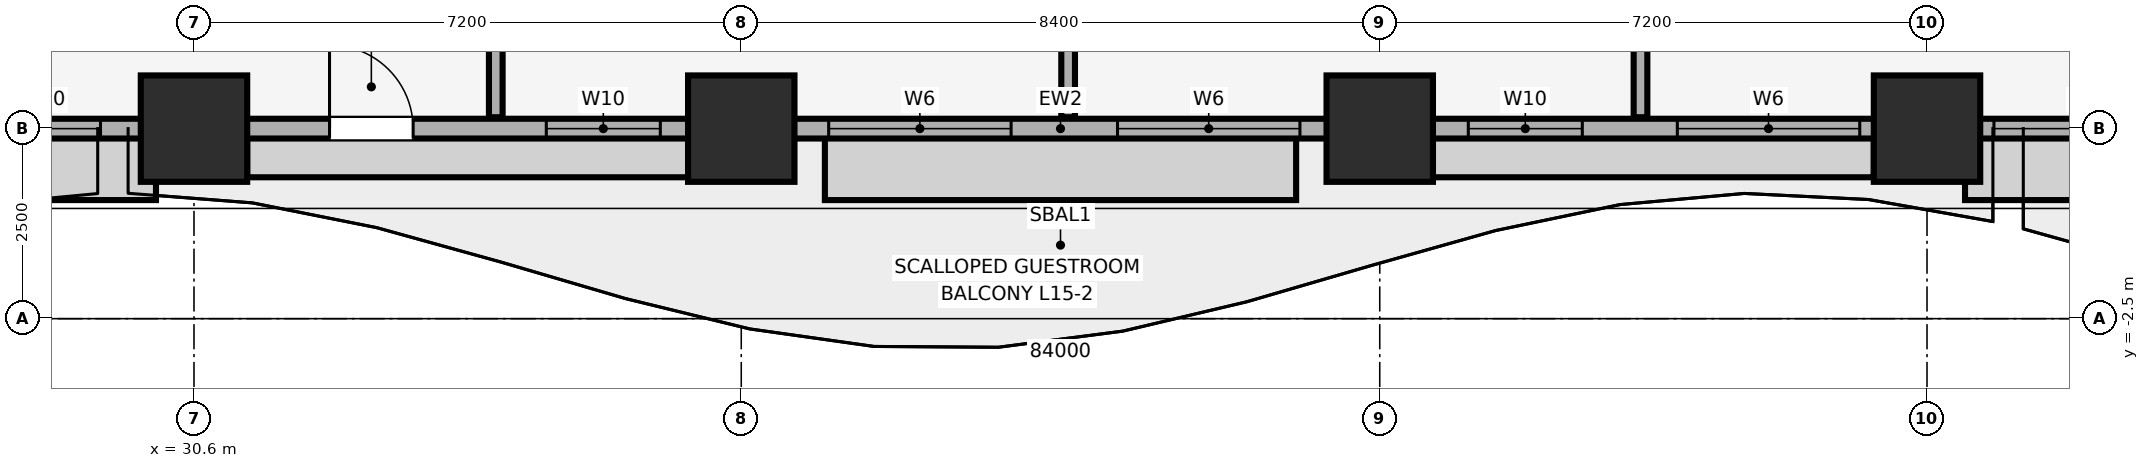
"""IFC4 building model, lengths in metres.
Left out: names, types, materials, properties, quantities, classifications, styles, units other than length and angle.
Written with IfcOpenShell. Run it as: python <this file> out.ifc"""

import sys

from ifc_helpers import new_model, si_unit, direction, frame, frame_2d, origin, origin_2d, place, context, subcontext, project, spatial, rectangle, extrude, element, fill, save


model = new_model("IFC4")
c1 = context("Model", 3, precision=1e-05, world=origin(), true_north=direction((0.0, 1.0)))
c2 = subcontext(c1, "Body", "Model", "MODEL_VIEW")
j1 = project(units=[si_unit("LENGTHUNIT", "METRE"), si_unit("PLANEANGLEUNIT", "RADIAN")], contexts=[c1])
p1 = place(None, origin())
s1 = spatial("IfcSite", under=j1, at=p1, CompositionType="ELEMENT")
p2 = place(p1, origin())
s2 = spatial("IfcBuilding", under=s1, at=p2, CompositionType="ELEMENT")
p3 = place(p2, frame((0.0, 0.0, 68.9)))
s3 = spatial("IfcBuildingStorey", under=s2, at=p3, CompositionType="ELEMENT", Elevation=68.9)
for number, where, z_axis, x_axis in (
    (1, (30.6, 0.0, 0.0), (0.0, 0.0, 1.0), (1.0, 0.0, 0.0)),
    (2, (37.8, 0.0, 0.0), (0.0, 0.0, 1.0), (1.0, 0.0, 0.0)),
    (3, (46.2, 0.0, 0.0), (0.0, 0.0, 1.0), (1.0, 0.0, 0.0)),
    (4, (53.4, 0.0, 0.0), (0.0, 0.0, 1.0), (1.0, 0.0, 0.0)),
):
    element("IfcColumn", number, at=place(p3, frame(where, z_axis=z_axis, x_axis=x_axis)), inside=s3, PredefinedType="COLUMN", context=c2, shape_type="SweptSolid", body=[
        extrude(rectangle(XDim=1.4, YDim=1.4, at=origin_2d()), origin(), (0.0, 0.0, 1.0), 3.51),
    ])
p4 = place(p3, frame((4.2, 0.0, 0.0), z_axis=(0.0, 0.0, 1.0), x_axis=(1.0, 0.0, 0.0)))
e5 = element("IfcWall", 5, at=p4, inside=s3, PredefinedType="SOLIDWALL", context=c2, shape_type="SweptSolid", body=[
    extrude(rectangle(XDim=75.6, YDim=0.26, at=frame_2d((37.8, 0.0))), origin(), (0.0, 0.0, 1.0), 2.56),
])
p5 = place(p4, frame((13.517, 0.0, 0.0)))
e6 = element("IfcOpeningElement", 6, at=p5, cuts=e5, PredefinedType="OPENING", context=c2, shape_type="SweptSolid", body=[
    extrude(rectangle(XDim=1.1, YDim=2.15, at=frame_2d((0.55, 1.075))), frame((0.0, 0.14, 0.0), z_axis=(0.0, -1.0, 0.0), x_axis=(1.0, 0.0, 0.0)), (0.0, 0.0, 1.0), 0.28),
])
p6 = place(p4, frame((28.183, 0.0, 0.0)))
e7 = element("IfcOpeningElement", 7, at=p6, cuts=e5, PredefinedType="OPENING", context=c2, shape_type="SweptSolid", body=[
    extrude(rectangle(XDim=1.1, YDim=2.15, at=frame_2d((0.55, 1.075))), frame((0.0, 0.14, 0.0), z_axis=(0.0, -1.0, 0.0), x_axis=(1.0, 0.0, 0.0)), (0.0, 0.0, 1.0), 0.28),
])
p7 = place(p4, frame((58.094, 0.0, 0.0)))
e8 = element("IfcOpeningElement", 8, at=p7, cuts=e5, PredefinedType="OPENING", context=c2, shape_type="SweptSolid", body=[
    extrude(rectangle(XDim=1.1, YDim=2.15, at=frame_2d((0.55, 1.075))), frame((0.0, 0.14, 0.0), z_axis=(0.0, -1.0, 0.0), x_axis=(1.0, 0.0, 0.0)), (0.0, 0.0, 1.0), 0.28),
])
p8 = place(p4, frame((1.035, 0.0, 0.85)))
e9 = element("IfcOpeningElement", 9, at=p8, cuts=e5, PredefinedType="OPENING", context=c2, shape_type="SweptSolid", body=[
    extrude(rectangle(XDim=2.4, YDim=1.5, at=frame_2d((1.2, 0.75))), frame((0.0, 0.14, 0.0), z_axis=(0.0, -1.0, 0.0), x_axis=(1.0, 0.0, 0.0)), (0.0, 0.0, 1.0), 0.28),
])
p9 = place(p4, frame((5.74, 0.0, 0.85)))
e10 = element("IfcOpeningElement", 10, at=p9, cuts=e5, PredefinedType="OPENING", context=c2, shape_type="SweptSolid", body=[
    extrude(rectangle(XDim=1.5, YDim=1.4, at=frame_2d((0.75, 0.7))), frame((0.0, 0.14, 0.0), z_axis=(0.0, -1.0, 0.0), x_axis=(1.0, 0.0, 0.0)), (0.0, 0.0, 1.0), 0.28),
])
p10 = place(p4, frame((8.49, 0.0, 0.85)))
e11 = element("IfcOpeningElement", 11, at=p10, cuts=e5, PredefinedType="OPENING", context=c2, shape_type="SweptSolid", body=[
    extrude(rectangle(XDim=2.4, YDim=1.5, at=frame_2d((1.2, 0.75))), frame((0.0, 0.14, 0.0), z_axis=(0.0, -1.0, 0.0), x_axis=(1.0, 0.0, 0.0)), (0.0, 0.0, 1.0), 0.28),
])
p11 = place(p4, frame((15.855, 0.0, 0.85)))
e12 = element("IfcOpeningElement", 12, at=p11, cuts=e5, PredefinedType="OPENING", context=c2, shape_type="SweptSolid", body=[
    extrude(rectangle(XDim=2.4, YDim=1.5, at=frame_2d((1.2, 0.75))), frame((0.0, 0.14, 0.0), z_axis=(0.0, -1.0, 0.0), x_axis=(1.0, 0.0, 0.0)), (0.0, 0.0, 1.0), 0.28),
])
p12 = place(p4, frame((20.02, 0.0, 0.85)))
e13 = element("IfcOpeningElement", 13, at=p12, cuts=e5, PredefinedType="OPENING", context=c2, shape_type="SweptSolid", body=[
    extrude(rectangle(XDim=2.4, YDim=1.5, at=frame_2d((1.2, 0.75))), frame((0.0, 0.14, 0.0), z_axis=(0.0, -1.0, 0.0), x_axis=(1.0, 0.0, 0.0)), (0.0, 0.0, 1.0), 0.28),
])
p13 = place(p4, frame((23.67, 0.0, 0.85)))
e14 = element("IfcOpeningElement", 14, at=p13, cuts=e5, PredefinedType="OPENING", context=c2, shape_type="SweptSolid", body=[
    extrude(rectangle(XDim=1.5, YDim=1.4, at=frame_2d((0.75, 0.7))), frame((0.0, 0.14, 0.0), z_axis=(0.0, -1.0, 0.0), x_axis=(1.0, 0.0, 0.0)), (0.0, 0.0, 1.0), 0.28),
])
p14 = place(p4, frame((31.035, 0.0, 0.85)))
e15 = element("IfcOpeningElement", 15, at=p14, cuts=e5, PredefinedType="OPENING", context=c2, shape_type="SweptSolid", body=[
    extrude(rectangle(XDim=1.5, YDim=1.4, at=frame_2d((0.75, 0.7))), frame((0.0, 0.14, 0.0), z_axis=(0.0, -1.0, 0.0), x_axis=(1.0, 0.0, 0.0)), (0.0, 0.0, 1.0), 0.28),
])
p15 = place(p4, frame((34.75, 0.0, 0.85)))
e16 = element("IfcOpeningElement", 16, at=p15, cuts=e5, PredefinedType="OPENING", context=c2, shape_type="SweptSolid", body=[
    extrude(rectangle(XDim=2.4, YDim=1.5, at=frame_2d((1.2, 0.75))), frame((0.0, 0.14, 0.0), z_axis=(0.0, -1.0, 0.0), x_axis=(1.0, 0.0, 0.0)), (0.0, 0.0, 1.0), 0.28),
])
p16 = place(p4, frame((38.55, 0.0, 0.85)))
e17 = element("IfcOpeningElement", 17, at=p16, cuts=e5, PredefinedType="OPENING", context=c2, shape_type="SweptSolid", body=[
    extrude(rectangle(XDim=2.4, YDim=1.5, at=frame_2d((1.2, 0.75))), frame((0.0, 0.14, 0.0), z_axis=(0.0, -1.0, 0.0), x_axis=(1.0, 0.0, 0.0)), (0.0, 0.0, 1.0), 0.28),
])
p17 = place(p4, frame((43.165, 0.0, 0.85)))
e18 = element("IfcOpeningElement", 18, at=p17, cuts=e5, PredefinedType="OPENING", context=c2, shape_type="SweptSolid", body=[
    extrude(rectangle(XDim=1.5, YDim=1.4, at=frame_2d((0.75, 0.7))), frame((0.0, 0.14, 0.0), z_axis=(0.0, -1.0, 0.0), x_axis=(1.0, 0.0, 0.0)), (0.0, 0.0, 1.0), 0.28),
])
p18 = place(p4, frame((45.915, 0.0, 0.85)))
e19 = element("IfcOpeningElement", 19, at=p18, cuts=e5, PredefinedType="OPENING", context=c2, shape_type="SweptSolid", body=[
    extrude(rectangle(XDim=2.4, YDim=1.5, at=frame_2d((1.2, 0.75))), frame((0.0, 0.14, 0.0), z_axis=(0.0, -1.0, 0.0), x_axis=(1.0, 0.0, 0.0)), (0.0, 0.0, 1.0), 0.28),
])
p19 = place(p4, frame((50.081, 0.0, 0.85)))
e20 = element("IfcOpeningElement", 20, at=p19, cuts=e5, PredefinedType="OPENING", context=c2, shape_type="SweptSolid", body=[
    extrude(rectangle(XDim=2.4, YDim=1.5, at=frame_2d((1.2, 0.75))), frame((0.0, 0.14, 0.0), z_axis=(0.0, -1.0, 0.0), x_axis=(1.0, 0.0, 0.0)), (0.0, 0.0, 1.0), 0.28),
])
p20 = place(p4, frame((53.73, 0.0, 0.85)))
e21 = element("IfcOpeningElement", 21, at=p20, cuts=e5, PredefinedType="OPENING", context=c2, shape_type="SweptSolid", body=[
    extrude(rectangle(XDim=1.5, YDim=1.4, at=frame_2d((0.75, 0.7))), frame((0.0, 0.14, 0.0), z_axis=(0.0, -1.0, 0.0), x_axis=(1.0, 0.0, 0.0)), (0.0, 0.0, 1.0), 0.28),
])
p21 = place(p4, frame((61.095, 0.0, 0.85)))
e22 = element("IfcOpeningElement", 22, at=p21, cuts=e5, PredefinedType="OPENING", context=c2, shape_type="SweptSolid", body=[
    extrude(rectangle(XDim=1.5, YDim=1.4, at=frame_2d((0.75, 0.7))), frame((0.0, 0.14, 0.0), z_axis=(0.0, -1.0, 0.0), x_axis=(1.0, 0.0, 0.0)), (0.0, 0.0, 1.0), 0.28),
])
p22 = place(p4, frame((64.76, 0.0, 0.85)))
e23 = element("IfcOpeningElement", 23, at=p22, cuts=e5, PredefinedType="OPENING", context=c2, shape_type="SweptSolid", body=[
    extrude(rectangle(XDim=2.4, YDim=1.5, at=frame_2d((1.2, 0.75))), frame((0.0, 0.14, 0.0), z_axis=(0.0, -1.0, 0.0), x_axis=(1.0, 0.0, 0.0)), (0.0, 0.0, 1.0), 0.28),
])
p23 = place(p4, frame((68.41, 0.0, 0.85)))
e24 = element("IfcOpeningElement", 24, at=p23, cuts=e5, PredefinedType="OPENING", context=c2, shape_type="SweptSolid", body=[
    extrude(rectangle(XDim=1.5, YDim=1.4, at=frame_2d((0.75, 0.7))), frame((0.0, 0.14, 0.0), z_axis=(0.0, -1.0, 0.0), x_axis=(1.0, 0.0, 0.0)), (0.0, 0.0, 1.0), 0.28),
])
p24 = place(p4, frame((72.165, 0.0, 0.85)))
e25 = element("IfcOpeningElement", 25, at=p24, cuts=e5, PredefinedType="OPENING", context=c2, shape_type="SweptSolid", body=[
    extrude(rectangle(XDim=2.4, YDim=1.5, at=frame_2d((1.2, 0.75))), frame((0.0, 0.14, 0.0), z_axis=(0.0, -1.0, 0.0), x_axis=(1.0, 0.0, 0.0)), (0.0, 0.0, 1.0), 0.28),
])
p25 = place(p3, frame((34.57, 0.15, 0.0), z_axis=(0.0, 0.0, 1.0), x_axis=(0.0, 1.0, 0.0)))
e26 = element("IfcWall", 26, at=p25, inside=s3, PredefinedType="PARTITIONING", context=c2, shape_type="SweptSolid", body=[
    extrude(rectangle(XDim=12.755, YDim=0.18, at=frame_2d((6.377, 0.0))), origin(), (0.0, 0.0, 1.0), 3.51),
])
for number, where, z_axis, x_axis in (
    (27, (42.1, 0.15, 0.0), (0.0, 0.0, 1.0), (0.0, 1.0, 0.0)),
    (28, (49.631, 0.15, 0.0), (0.0, 0.0, 1.0), (0.0, 1.0, 0.0)),
):
    element("IfcWall", number, at=place(p3, frame(where, z_axis=z_axis, x_axis=x_axis)), inside=s3, PredefinedType="PARTITIONING", context=c2, shape_type="SweptSolid", body=[
        extrude(rectangle(XDim=12.755, YDim=0.18, at=frame_2d((6.377, 0.0))), origin(), (0.0, 0.0, 1.0), 2.898),
    ])
p26 = place(p6, origin())
e29 = element("IfcDoor", 29, at=p26, inside=s3, OperationType="SINGLE_SWING_LEFT", PredefinedType="DOOR", context=c2, shape_type="SweptSolid", body=[
    extrude(rectangle(XDim=1.1, YDim=2.15, at=frame_2d((0.55, 1.075))), frame((0.0, 0.025, 0.0), z_axis=(0.0, -1.0, 0.0), x_axis=(1.0, 0.0, 0.0)), (0.0, 0.0, 1.0), 0.05),
])
fill(e7, e29)
p27 = place(p13, origin())
e30 = element("IfcWindow", 30, at=p27, inside=s3, PartitioningType="SINGLE_PANEL", PredefinedType="WINDOW", context=c2, shape_type="SweptSolid", body=[
    extrude(rectangle(XDim=1.5, YDim=1.4, at=frame_2d((0.75, 0.7))), frame((0.0, 0.03, 0.0), z_axis=(0.0, -1.0, 0.0), x_axis=(1.0, 0.0, 0.0)), (0.0, 0.0, 1.0), 0.06),
])
fill(e14, e30)
p28 = place(p14, origin())
e31 = element("IfcWindow", 31, at=p28, inside=s3, PartitioningType="SINGLE_PANEL", PredefinedType="WINDOW", context=c2, shape_type="SweptSolid", body=[
    extrude(rectangle(XDim=1.5, YDim=1.4, at=frame_2d((0.75, 0.7))), frame((0.0, 0.03, 0.0), z_axis=(0.0, -1.0, 0.0), x_axis=(1.0, 0.0, 0.0)), (0.0, 0.0, 1.0), 0.06),
])
fill(e15, e31)
p29 = place(p15, origin())
e32 = element("IfcWindow", 32, at=p29, inside=s3, PartitioningType="SINGLE_PANEL", PredefinedType="WINDOW", context=c2, shape_type="SweptSolid", body=[
    extrude(rectangle(XDim=2.4, YDim=1.5, at=frame_2d((1.2, 0.75))), frame((0.0, 0.03, 0.0), z_axis=(0.0, -1.0, 0.0), x_axis=(1.0, 0.0, 0.0)), (0.0, 0.0, 1.0), 0.06),
])
fill(e16, e32)
p30 = place(p16, origin())
e33 = element("IfcWindow", 33, at=p30, inside=s3, PartitioningType="SINGLE_PANEL", PredefinedType="WINDOW", context=c2, shape_type="SweptSolid", body=[
    extrude(rectangle(XDim=2.4, YDim=1.5, at=frame_2d((1.2, 0.75))), frame((0.0, 0.03, 0.0), z_axis=(0.0, -1.0, 0.0), x_axis=(1.0, 0.0, 0.0)), (0.0, 0.0, 1.0), 0.06),
])
fill(e17, e33)
p31 = place(p17, origin())
e34 = element("IfcWindow", 34, at=p31, inside=s3, PartitioningType="SINGLE_PANEL", PredefinedType="WINDOW", context=c2, shape_type="SweptSolid", body=[
    extrude(rectangle(XDim=1.5, YDim=1.4, at=frame_2d((0.75, 0.7))), frame((0.0, 0.03, 0.0), z_axis=(0.0, -1.0, 0.0), x_axis=(1.0, 0.0, 0.0)), (0.0, 0.0, 1.0), 0.06),
])
fill(e18, e34)
p32 = place(p18, origin())
e35 = element("IfcWindow", 35, at=p32, inside=s3, PartitioningType="SINGLE_PANEL", PredefinedType="WINDOW", context=c2, shape_type="SweptSolid", body=[
    extrude(rectangle(XDim=2.4, YDim=1.5, at=frame_2d((1.2, 0.75))), frame((0.0, 0.03, 0.0), z_axis=(0.0, -1.0, 0.0), x_axis=(1.0, 0.0, 0.0)), (0.0, 0.0, 1.0), 0.06),
])
fill(e19, e35)
p33 = place(p19, origin())
e36 = element("IfcWindow", 36, at=p33, inside=s3, PartitioningType="SINGLE_PANEL", PredefinedType="WINDOW", context=c2, shape_type="SweptSolid", body=[
    extrude(rectangle(XDim=2.4, YDim=1.5, at=frame_2d((1.2, 0.75))), frame((0.0, 0.03, 0.0), z_axis=(0.0, -1.0, 0.0), x_axis=(1.0, 0.0, 0.0)), (0.0, 0.0, 1.0), 0.06),
])
fill(e20, e36)
save(model, sys.argv[1])
